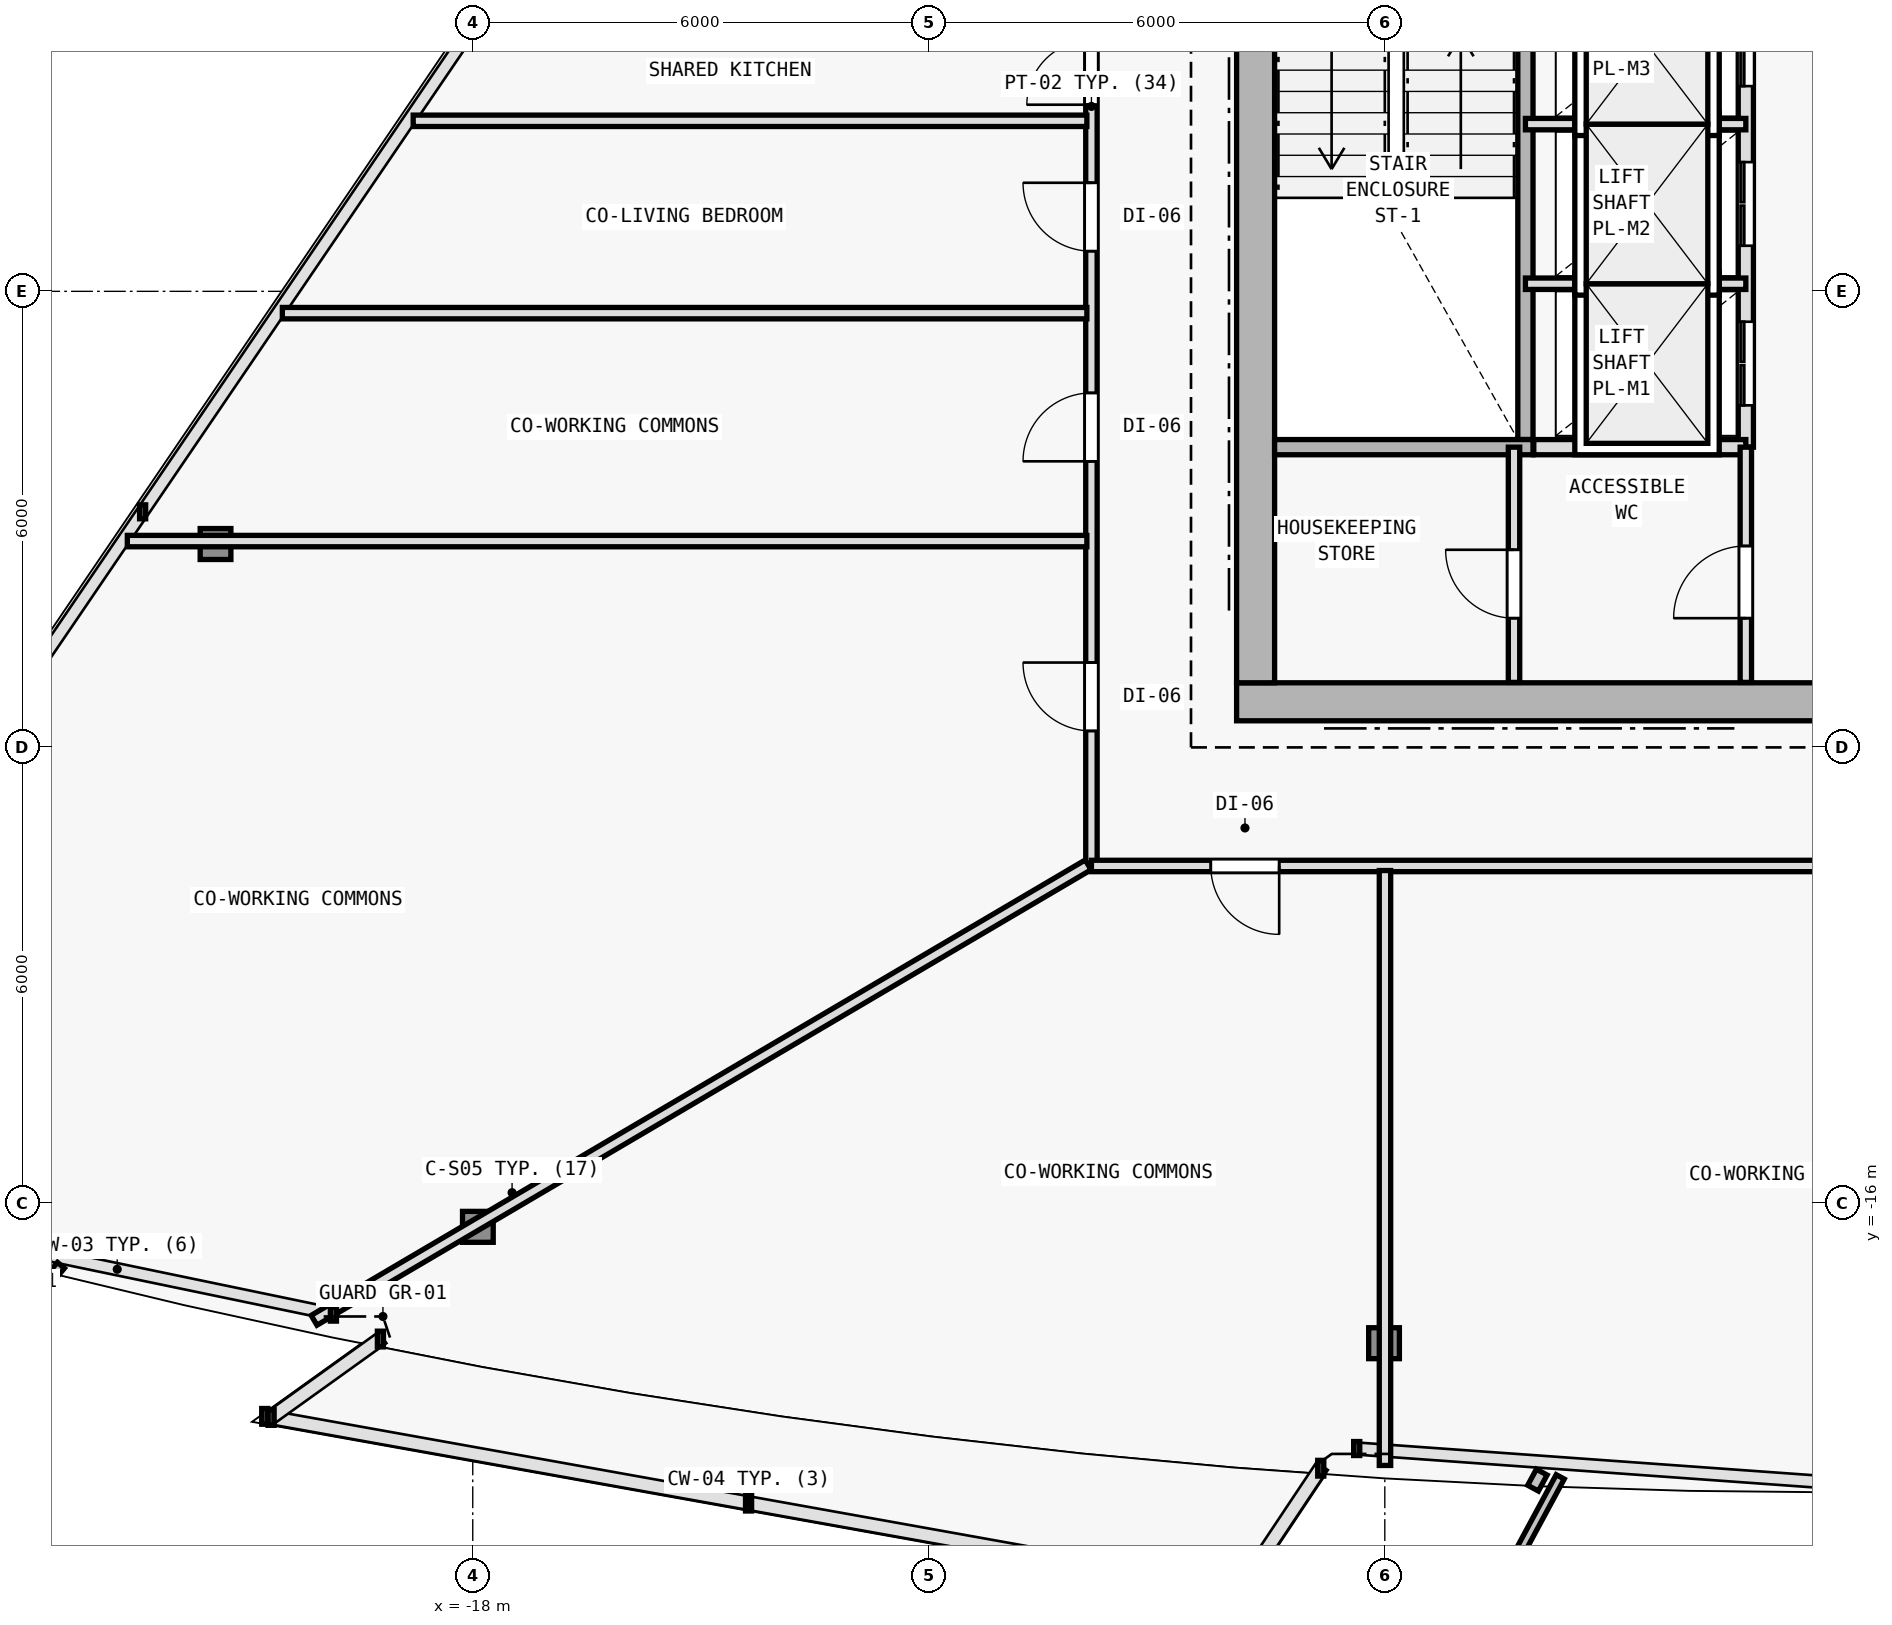
"""IFC4 building model, lengths in metres.
Left out: names, types, materials, properties, quantities, classifications, styles, units other than length and angle.
Written with IfcOpenShell. Run it as: python <this file> out.ifc"""

import sys

from ifc_helpers import new_model, si_unit, direction, frame, frame_2d, origin, origin_2d, place, context, subcontext, project, spatial, rectangle, i_section, extrude, element, fill, save


model = new_model("IFC4")
c1 = context("Model", 3, precision=1e-05, world=origin(), true_north=direction((0.0, 1.0)))
c2 = subcontext(c1, "Body", "Model", "MODEL_VIEW")
j1 = project(units=[si_unit("LENGTHUNIT", "METRE"), si_unit("PLANEANGLEUNIT", "RADIAN")], contexts=[c1])
p1 = place(None, origin())
s1 = spatial("IfcSite", under=j1, at=p1, CompositionType="ELEMENT")
p2 = place(p1, origin())
s2 = spatial("IfcBuilding", under=s1, at=p2, CompositionType="ELEMENT")
p3 = place(p2, frame((0.0, 0.0, 149.4)))
s3 = spatial("IfcBuildingStorey", under=s2, at=p3, CompositionType="ELEMENT", Elevation=149.4)
p4 = place(p3, frame((-7.7, -9.4, 0.0), z_axis=(0.0, 0.0, 1.0), x_axis=(1.0, 0.0, 0.0)))
e1 = element("IfcColumn", 1, at=p4, inside=s3, PredefinedType="COLUMN", context=c2, shape_type="SweptSolid", body=[
    extrude(i_section(OverallWidth=0.404, OverallDepth=0.407, WebThickness=0.017, FlangeThickness=0.028, FilletRadius=0.015, at=origin_2d()), origin(), (0.0, 0.0, 1.0), 3.6),
])
p5 = place(p3, frame((-17.933, -16.308, 0.006), z_axis=(0.020596292833, 0.033511459955, 0.999226087917), x_axis=(-0.851954850327, 0.523615252838, 0.0)))
e2 = element("IfcColumn", 2, at=p5, inside=s3, PredefinedType="COLUMN", context=c2, shape_type="SweptSolid", body=[
    extrude(i_section(OverallWidth=0.404, OverallDepth=0.407, WebThickness=0.017, FlangeThickness=0.028, FilletRadius=0.015, at=origin_2d()), origin(), (0.0, 0.0, 1.0), 3.592),
])
p6 = place(p3, frame((-6.01, -17.838, 0.006), z_axis=(0.006934288159, 0.035283289748, 0.999353293441), x_axis=(-0.981229659911, 0.192842823335, 0.0)))
e3 = element("IfcColumn", 3, at=p6, inside=s3, PredefinedType="COLUMN", context=c2, shape_type="SweptSolid", body=[
    extrude(i_section(OverallWidth=0.404, OverallDepth=0.407, WebThickness=0.017, FlangeThickness=0.028, FilletRadius=0.015, at=origin_2d()), origin(), (0.0, 0.0, 1.0), 3.591),
])
p7 = place(p3, frame((-21.384, -7.324, 0.006), z_axis=(0.025224163578, 0.021620711639, 0.999447990843), x_axis=(-0.650791373456, 0.759256602365, 0.0)))
e4 = element("IfcColumn", 4, at=p7, inside=s3, PredefinedType="COLUMN", context=c2, shape_type="SweptSolid", body=[
    extrude(i_section(OverallWidth=0.404, OverallDepth=0.407, WebThickness=0.017, FlangeThickness=0.028, FilletRadius=0.015, at=origin_2d()), origin(), (0.0, 0.0, 1.0), 3.591),
])
p8 = place(p3, frame((-7.95, -9.4, 0.0), z_axis=(0.0, 0.0, 1.0), x_axis=(1.0, 0.0, 0.0)))
e5 = element("IfcWall", 5, at=p8, inside=s3, PredefinedType="SHEAR", context=c2, shape_type="SweptSolid", body=[
    extrude(rectangle(XDim=15.9, YDim=0.5, at=frame_2d((7.95, 0.0))), origin(), (0.0, 0.0, 1.0), 3.35),
])
p9 = place(p8, frame((9.6, 0.0, 0.0)))
e6 = element("IfcOpeningElement", 6, at=p9, cuts=e5, PredefinedType="OPENING", context=c2, shape_type="SweptSolid", body=[
    extrude(rectangle(XDim=1.5, YDim=2.2, at=frame_2d((0.75, 1.1))), frame((0.0, 0.26, 0.0), z_axis=(0.0, -1.0, 0.0), x_axis=(1.0, 0.0, 0.0)), (0.0, 0.0, 1.0), 0.52),
])
p10 = place(p3, frame((-7.7, -9.15, 0.0), z_axis=(0.0, 0.0, 1.0), x_axis=(0.0, 1.0, 0.0)))
e7 = element("IfcWall", 7, at=p10, inside=s3, PredefinedType="SHEAR", context=c2, shape_type="SweptSolid", body=[
    extrude(rectangle(XDim=19.1, YDim=0.5, at=frame_2d((9.55, 0.0))), origin(), (0.0, 0.0, 1.0), 3.35),
])
p11 = place(p10, frame((12.7, 0.0, 0.0)))
e8 = element("IfcOpeningElement", 8, at=p11, cuts=e7, PredefinedType="OPENING", context=c2, shape_type="SweptSolid", body=[
    extrude(rectangle(XDim=1.1, YDim=2.15, at=frame_2d((0.55, 1.075))), frame((0.0, 0.26, 0.0), z_axis=(0.0, -1.0, 0.0), x_axis=(1.0, 0.0, 0.0)), (0.0, 0.0, 1.0), 0.52),
])
p12 = place(p3, frame((-4.15, -5.95, 0.0), z_axis=(0.0, 0.0, 1.0), x_axis=(0.0, 1.0, 0.0)))
e9 = element("IfcWall", 9, at=p12, inside=s3, PredefinedType="SOLIDWALL", context=c2, shape_type="SweptSolid", body=[
    extrude(rectangle(XDim=7.2, YDim=0.2, at=frame_2d((3.6, 0.0))), origin(), (0.0, 0.0, 1.0), 3.35),
])
p13 = place(p3, frame((-1.25, -6.05, 0.0), z_axis=(0.0, 0.0, 1.0), x_axis=(0.0, 1.0, 0.0)))
e10 = element("IfcWall", 10, at=p13, inside=s3, PredefinedType="SOLIDWALL", context=c2, shape_type="SweptSolid", body=[
    extrude(rectangle(XDim=8.7, YDim=0.2, at=frame_2d((4.35, 0.0))), origin(), (0.0, 0.0, 1.0), 3.35),
])
p14 = place(p13, frame((0.55, 0.0, 0.0)))
e11 = element("IfcOpeningElement", 11, at=p14, cuts=e10, PredefinedType="OPENING", context=c2, shape_type="SweptSolid", body=[
    extrude(rectangle(XDim=1.1, YDim=2.15, at=frame_2d((0.55, 1.075))), frame((0.0, 0.11, 0.0), z_axis=(0.0, -1.0, 0.0), x_axis=(1.0, 0.0, 0.0)), (0.0, 0.0, 1.0), 0.22),
])
p15 = place(p13, frame((2.65, 0.0, 0.0)))
e12 = element("IfcOpeningElement", 12, at=p15, cuts=e10, PredefinedType="OPENING", context=c2, shape_type="SweptSolid", body=[
    extrude(rectangle(XDim=1.1, YDim=2.15, at=frame_2d((0.55, 1.075))), frame((0.0, 0.11, 0.0), z_axis=(0.0, -1.0, 0.0), x_axis=(1.0, 0.0, 0.0)), (0.0, 0.0, 1.0), 0.22),
])
p16 = place(p13, frame((4.75, 0.0, 0.0)))
e13 = element("IfcOpeningElement", 13, at=p16, cuts=e10, PredefinedType="OPENING", context=c2, shape_type="SweptSolid", body=[
    extrude(rectangle(XDim=1.1, YDim=2.15, at=frame_2d((0.55, 1.075))), frame((0.0, 0.11, 0.0), z_axis=(0.0, -1.0, 0.0), x_axis=(1.0, 0.0, 0.0)), (0.0, 0.0, 1.0), 0.22),
])
p17 = place(p13, frame((6.85, 0.0, 0.0)))
e14 = element("IfcOpeningElement", 14, at=p17, cuts=e10, PredefinedType="OPENING", context=c2, shape_type="SweptSolid", body=[
    extrude(rectangle(XDim=1.1, YDim=2.15, at=frame_2d((0.55, 1.075))), frame((0.0, 0.11, 0.0), z_axis=(0.0, -1.0, 0.0), x_axis=(1.0, 0.0, 0.0)), (0.0, 0.0, 1.0), 0.22),
])
for number, where, z_axis, x_axis in (
    (15, (-4.15, -3.9, 0.0), (0.0, 0.0, 1.0), (1.0, 0.0, 0.0)),
    (16, (-4.15, -1.8, 0.0), (0.0, 0.0, 1.0), (1.0, 0.0, 0.0)),
):
    element("IfcWall", number, at=place(p3, frame(where, z_axis=z_axis, x_axis=x_axis)), inside=s3, PredefinedType="PARTITIONING", context=c2, shape_type="SweptSolid", body=[
        extrude(rectangle(XDim=2.9, YDim=0.15, at=frame_2d((1.45, 0.0))), origin(), (0.0, 0.0, 1.0), 3.35),
    ])
p18 = place(p3, frame((-7.45, -6.05, 0.0), z_axis=(0.0, 0.0, 1.0), x_axis=(1.0, 0.0, 0.0)))
e17 = element("IfcWall", 17, at=p18, inside=s3, PredefinedType="SOLIDWALL", context=c2, shape_type="SweptSolid", body=[
    extrude(rectangle(XDim=3.4, YDim=0.2, at=frame_2d((1.7, 0.0))), origin(), (0.0, 0.0, 1.0), 3.35),
])
p19 = place(p3, frame((-4.04, -6.05, 0.0), z_axis=(0.0, 0.0, 1.0), x_axis=(1.0, 0.0, 0.0)))
e18 = element("IfcWall", 18, at=p19, inside=s3, PredefinedType="SOLIDWALL", context=c2, shape_type="SweptSolid", body=[
    extrude(rectangle(XDim=2.79, YDim=0.2, at=frame_2d((1.395, 0.0))), origin(), (0.0, 0.0, 1.0), 3.35),
])
p20 = place(p3, frame((-1.25, -9.145, 0.0), z_axis=(0.0, 0.0, 1.0), x_axis=(0.0, 1.0, 0.0)))
e19 = element("IfcWall", 19, at=p20, inside=s3, PredefinedType="PARTITIONING", context=c2, shape_type="SweptSolid", body=[
    extrude(rectangle(XDim=3.095, YDim=0.15, at=frame_2d((1.547, 0.0))), origin(), (0.0, 0.0, 1.0), 3.35),
])
p21 = place(p20, frame((0.845, 0.0, 0.0)))
e20 = element("IfcOpeningElement", 20, at=p21, cuts=e19, PredefinedType="OPENING", context=c2, shape_type="SweptSolid", body=[
    extrude(rectangle(XDim=0.95, YDim=2.1, at=frame_2d((0.475, 1.05))), frame((0.0, 0.085, 0.0), z_axis=(0.0, -1.0, 0.0), x_axis=(1.0, 0.0, 0.0)), (0.0, 0.0, 1.0), 0.17),
])
p22 = place(p3, frame((-4.3, -9.145, 0.0), z_axis=(0.0, 0.0, 1.0), x_axis=(0.0, 1.0, 0.0)))
e21 = element("IfcWall", 21, at=p22, inside=s3, PredefinedType="PARTITIONING", context=c2, shape_type="SweptSolid", body=[
    extrude(rectangle(XDim=3.095, YDim=0.15, at=frame_2d((1.547, 0.0))), origin(), (0.0, 0.0, 1.0), 3.35),
])
p23 = place(p22, frame((0.845, 0.0, 0.0)))
e22 = element("IfcOpeningElement", 22, at=p23, cuts=e21, PredefinedType="OPENING", context=c2, shape_type="SweptSolid", body=[
    extrude(rectangle(XDim=0.9, YDim=2.1, at=frame_2d((0.45, 1.05))), frame((0.0, 0.085, 0.0), z_axis=(0.0, -1.0, 0.0), x_axis=(1.0, 0.0, 0.0)), (0.0, 0.0, 1.0), 0.17),
])
p24 = place(p3, frame((-9.86, -11.56, 0.0), z_axis=(0.0, 0.0, 1.0), x_axis=(0.0, 1.0, 0.0)))
e23 = element("IfcWall", 23, at=p24, inside=s3, PredefinedType="PARTITIONING", context=c2, shape_type="SweptSolid", body=[
    extrude(rectangle(XDim=19.986, YDim=0.15, at=frame_2d((9.993, 0.0))), origin(), (0.0, 0.0, 1.0), 2.775),
])
p25 = place(p24, frame((11.398, 0.0, 0.0)))
e24 = element("IfcOpeningElement", 24, at=p25, cuts=e23, PredefinedType="OPENING", context=c2, shape_type="SweptSolid", body=[
    extrude(rectangle(XDim=0.85, YDim=2.1, at=frame_2d((0.425, 1.05))), frame((0.0, 0.085, 0.0), z_axis=(0.0, -1.0, 0.0), x_axis=(1.0, 0.0, 0.0)), (0.0, 0.0, 1.0), 0.17),
])
p26 = place(p24, frame((10.015, 0.0, 0.0)))
e25 = element("IfcOpeningElement", 25, at=p26, cuts=e23, PredefinedType="OPENING", context=c2, shape_type="SweptSolid", body=[
    extrude(rectangle(XDim=0.85, YDim=2.1, at=frame_2d((0.425, 1.05))), frame((0.0, 0.085, 0.0), z_axis=(0.0, -1.0, 0.0), x_axis=(1.0, 0.0, 0.0)), (0.0, 0.0, 1.0), 0.17),
])
p27 = place(p24, frame((8.088, 0.0, 0.0)))
e26 = element("IfcOpeningElement", 26, at=p27, cuts=e23, PredefinedType="OPENING", context=c2, shape_type="SweptSolid", body=[
    extrude(rectangle(XDim=0.9, YDim=2.1, at=frame_2d((0.45, 1.05))), frame((0.0, 0.085, 0.0), z_axis=(0.0, -1.0, 0.0), x_axis=(1.0, 0.0, 0.0)), (0.0, 0.0, 1.0), 0.17),
])
p28 = place(p24, frame((5.324, 0.0, 0.0)))
e27 = element("IfcOpeningElement", 27, at=p28, cuts=e23, PredefinedType="OPENING", context=c2, shape_type="SweptSolid", body=[
    extrude(rectangle(XDim=0.9, YDim=2.1, at=frame_2d((0.45, 1.05))), frame((0.0, 0.085, 0.0), z_axis=(0.0, -1.0, 0.0), x_axis=(1.0, 0.0, 0.0)), (0.0, 0.0, 1.0), 0.17),
])
p29 = place(p24, frame((1.776, 0.0, 0.0)))
e28 = element("IfcOpeningElement", 28, at=p29, cuts=e23, PredefinedType="OPENING", context=c2, shape_type="SweptSolid", body=[
    extrude(rectangle(XDim=0.9, YDim=2.1, at=frame_2d((0.45, 1.05))), frame((0.0, 0.085, 0.0), z_axis=(0.0, -1.0, 0.0), x_axis=(1.0, 0.0, 0.0)), (0.0, 0.0, 1.0), 0.17),
])
p30 = place(p24, frame((13.266, 0.0, 0.0)))
e29 = element("IfcOpeningElement", 29, at=p30, cuts=e23, PredefinedType="OPENING", context=c2, shape_type="SweptSolid", body=[
    extrude(rectangle(XDim=0.9, YDim=2.1, at=frame_2d((0.45, 1.05))), frame((0.0, 0.085, 0.0), z_axis=(0.0, -1.0, 0.0), x_axis=(1.0, 0.0, 0.0)), (0.0, 0.0, 1.0), 0.17),
])
p31 = place(p3, frame((13.18, -11.56, 0.0), z_axis=(0.0, 0.0, 1.0), x_axis=(-1.0, 0.0, 0.0)))
e30 = element("IfcWall", 30, at=p31, inside=s3, PredefinedType="PARTITIONING", context=c2, shape_type="SweptSolid", body=[
    extrude(rectangle(XDim=23.04, YDim=0.15, at=frame_2d((11.52, 0.0))), origin(), (0.0, 0.0, 1.0), 2.775),
])
p32 = place(p31, frame((20.57, 0.0, 0.0)))
e31 = element("IfcOpeningElement", 31, at=p32, cuts=e30, PredefinedType="OPENING", context=c2, shape_type="SweptSolid", body=[
    extrude(rectangle(XDim=0.9, YDim=2.1, at=frame_2d((0.45, 1.05))), frame((0.0, 0.085, 0.0), z_axis=(0.0, -1.0, 0.0), x_axis=(1.0, 0.0, 0.0)), (0.0, 0.0, 1.0), 0.17),
])
p33 = place(p31, frame((10.563, 0.0, 0.0)))
e32 = element("IfcOpeningElement", 32, at=p33, cuts=e30, PredefinedType="OPENING", context=c2, shape_type="SweptSolid", body=[
    extrude(rectangle(XDim=0.9, YDim=2.1, at=frame_2d((0.45, 1.05))), frame((0.0, 0.085, 0.0), z_axis=(0.0, -1.0, 0.0), x_axis=(1.0, 0.0, 0.0)), (0.0, 0.0, 1.0), 0.17),
])
p34 = place(p3, frame((-9.903, -11.546, 0.0), z_axis=(0.0, 0.0, 1.0), x_axis=(-0.861918279973, -0.507047215403, 0.0)))
e33 = element("IfcWall", 33, at=p34, inside=s3, PredefinedType="PARTITIONING", context=c2, shape_type="SweptSolid", body=[
    extrude(rectangle(XDim=11.816, YDim=0.15, at=frame_2d((5.908, 0.0))), origin(), (0.0, 0.0, 1.0), 2.775),
])
p35 = place(p3, frame((-5.998, -11.62, 0.0), z_axis=(0.0, 0.0, 1.0), x_axis=(0.0, -1.0, 0.0)))
e34 = element("IfcWall", 34, at=p35, inside=s3, PredefinedType="PARTITIONING", context=c2, shape_type="SweptSolid", body=[
    extrude(rectangle(XDim=7.827, YDim=0.15, at=frame_2d((3.913, 0.0))), origin(), (0.0, 0.0, 1.0), 2.775),
])
p36 = place(p3, frame((-9.92, -7.286, 0.0), z_axis=(0.0, 0.0, 1.0), x_axis=(-1.0, 0.0, 0.0)))
e35 = element("IfcWall", 35, at=p36, inside=s3, PredefinedType="PARTITIONING", context=c2, shape_type="SweptSolid", body=[
    extrude(rectangle(XDim=12.625, YDim=0.15, at=frame_2d((6.312, 0.0))), origin(), (0.0, 0.0, 1.0), 2.775),
])
p37 = place(p3, frame((-9.92, -1.757, 0.0), z_axis=(0.0, 0.0, 1.0), x_axis=(-1.0, 0.0, 0.0)))
e36 = element("IfcWall", 36, at=p37, inside=s3, PredefinedType="PARTITIONING", context=c2, shape_type="SweptSolid", body=[
    extrude(rectangle(XDim=8.864, YDim=0.15, at=frame_2d((4.432, 0.0))), origin(), (0.0, 0.0, 1.0), 2.885),
])
p38 = place(p3, frame((-9.92, -4.287, 0.0), z_axis=(0.0, 0.0, 1.0), x_axis=(-1.0, 0.0, 0.0)))
e37 = element("IfcWall", 37, at=p38, inside=s3, PredefinedType="PARTITIONING", context=c2, shape_type="SweptSolid", body=[
    extrude(rectangle(XDim=10.585, YDim=0.15, at=frame_2d((5.292, 0.0))), origin(), (0.0, 0.0, 1.0), 2.885),
])
p39 = place(p14, origin())
e38 = element("IfcDoor", 38, at=p39, inside=s3, OperationType="DOUBLE_DOOR_SLIDING", PredefinedType="DOOR", context=c2, shape_type="SweptSolid", body=[
    extrude(rectangle(XDim=1.1, YDim=2.15, at=frame_2d((0.55, 1.075))), frame((0.0, 0.025, 0.0), z_axis=(0.0, -1.0, 0.0), x_axis=(1.0, 0.0, 0.0)), (0.0, 0.0, 1.0), 0.05),
])
fill(e11, e38)
p40 = place(p15, origin())
e39 = element("IfcDoor", 39, at=p40, inside=s3, OperationType="DOUBLE_DOOR_SLIDING", PredefinedType="DOOR", context=c2, shape_type="SweptSolid", body=[
    extrude(rectangle(XDim=1.1, YDim=2.15, at=frame_2d((0.55, 1.075))), frame((0.0, 0.025, 0.0), z_axis=(0.0, -1.0, 0.0), x_axis=(1.0, 0.0, 0.0)), (0.0, 0.0, 1.0), 0.05),
])
fill(e12, e39)
p41 = place(p16, origin())
e40 = element("IfcDoor", 40, at=p41, inside=s3, OperationType="DOUBLE_DOOR_SLIDING", PredefinedType="DOOR", context=c2, shape_type="SweptSolid", body=[
    extrude(rectangle(XDim=1.1, YDim=2.15, at=frame_2d((0.55, 1.075))), frame((0.0, 0.025, 0.0), z_axis=(0.0, -1.0, 0.0), x_axis=(1.0, 0.0, 0.0)), (0.0, 0.0, 1.0), 0.05),
])
fill(e13, e40)
p42 = place(p21, origin())
e41 = element("IfcDoor", 41, at=p42, inside=s3, OperationType="SINGLE_SWING_LEFT", PredefinedType="DOOR", context=c2, shape_type="SweptSolid", body=[
    extrude(rectangle(XDim=0.95, YDim=2.1, at=frame_2d((0.475, 1.05))), frame((0.0, 0.025, 0.0), z_axis=(0.0, -1.0, 0.0), x_axis=(1.0, 0.0, 0.0)), (0.0, 0.0, 1.0), 0.05),
])
fill(e20, e41)
p43 = place(p23, origin())
e42 = element("IfcDoor", 42, at=p43, inside=s3, OperationType="SINGLE_SWING_RIGHT", PredefinedType="DOOR", context=c2, shape_type="SweptSolid", body=[
    extrude(rectangle(XDim=0.9, YDim=2.1, at=frame_2d((0.45, 1.05))), frame((0.0, 0.025, 0.0), z_axis=(0.0, -1.0, 0.0), x_axis=(1.0, 0.0, 0.0)), (0.0, 0.0, 1.0), 0.05),
])
fill(e22, e42)
p44 = place(p26, origin())
e43 = element("IfcDoor", 43, at=p44, inside=s3, OperationType="SINGLE_SWING_LEFT", PredefinedType="DOOR", context=c2, shape_type="SweptSolid", body=[
    extrude(rectangle(XDim=0.85, YDim=2.1, at=frame_2d((0.425, 1.05))), frame((0.0, 0.025, 0.0), z_axis=(0.0, -1.0, 0.0), x_axis=(1.0, 0.0, 0.0)), (0.0, 0.0, 1.0), 0.05),
])
fill(e25, e43)
p45 = place(p27, origin())
e44 = element("IfcDoor", 44, at=p45, inside=s3, OperationType="SINGLE_SWING_RIGHT", PredefinedType="DOOR", context=c2, shape_type="SweptSolid", body=[
    extrude(rectangle(XDim=0.9, YDim=2.1, at=frame_2d((0.45, 1.05))), frame((0.0, 0.025, 0.0), z_axis=(0.0, -1.0, 0.0), x_axis=(1.0, 0.0, 0.0)), (0.0, 0.0, 1.0), 0.05),
])
fill(e26, e44)
p46 = place(p28, origin())
e45 = element("IfcDoor", 45, at=p46, inside=s3, OperationType="SINGLE_SWING_LEFT", PredefinedType="DOOR", context=c2, shape_type="SweptSolid", body=[
    extrude(rectangle(XDim=0.9, YDim=2.1, at=frame_2d((0.45, 1.05))), frame((0.0, 0.025, 0.0), z_axis=(0.0, -1.0, 0.0), x_axis=(1.0, 0.0, 0.0)), (0.0, 0.0, 1.0), 0.05),
])
fill(e27, e45)
p47 = place(p29, origin())
e46 = element("IfcDoor", 46, at=p47, inside=s3, OperationType="SINGLE_SWING_RIGHT", PredefinedType="DOOR", context=c2, shape_type="SweptSolid", body=[
    extrude(rectangle(XDim=0.9, YDim=2.1, at=frame_2d((0.45, 1.05))), frame((0.0, 0.025, 0.0), z_axis=(0.0, -1.0, 0.0), x_axis=(1.0, 0.0, 0.0)), (0.0, 0.0, 1.0), 0.05),
])
fill(e28, e46)
p48 = place(p32, origin())
e47 = element("IfcDoor", 47, at=p48, inside=s3, OperationType="SINGLE_SWING_LEFT", PredefinedType="DOOR", context=c2, shape_type="SweptSolid", body=[
    extrude(rectangle(XDim=0.9, YDim=2.1, at=frame_2d((0.45, 1.05))), frame((0.0, 0.025, 0.0), z_axis=(0.0, -1.0, 0.0), x_axis=(1.0, 0.0, 0.0)), (0.0, 0.0, 1.0), 0.05),
])
fill(e31, e47)
save(model, sys.argv[1])
